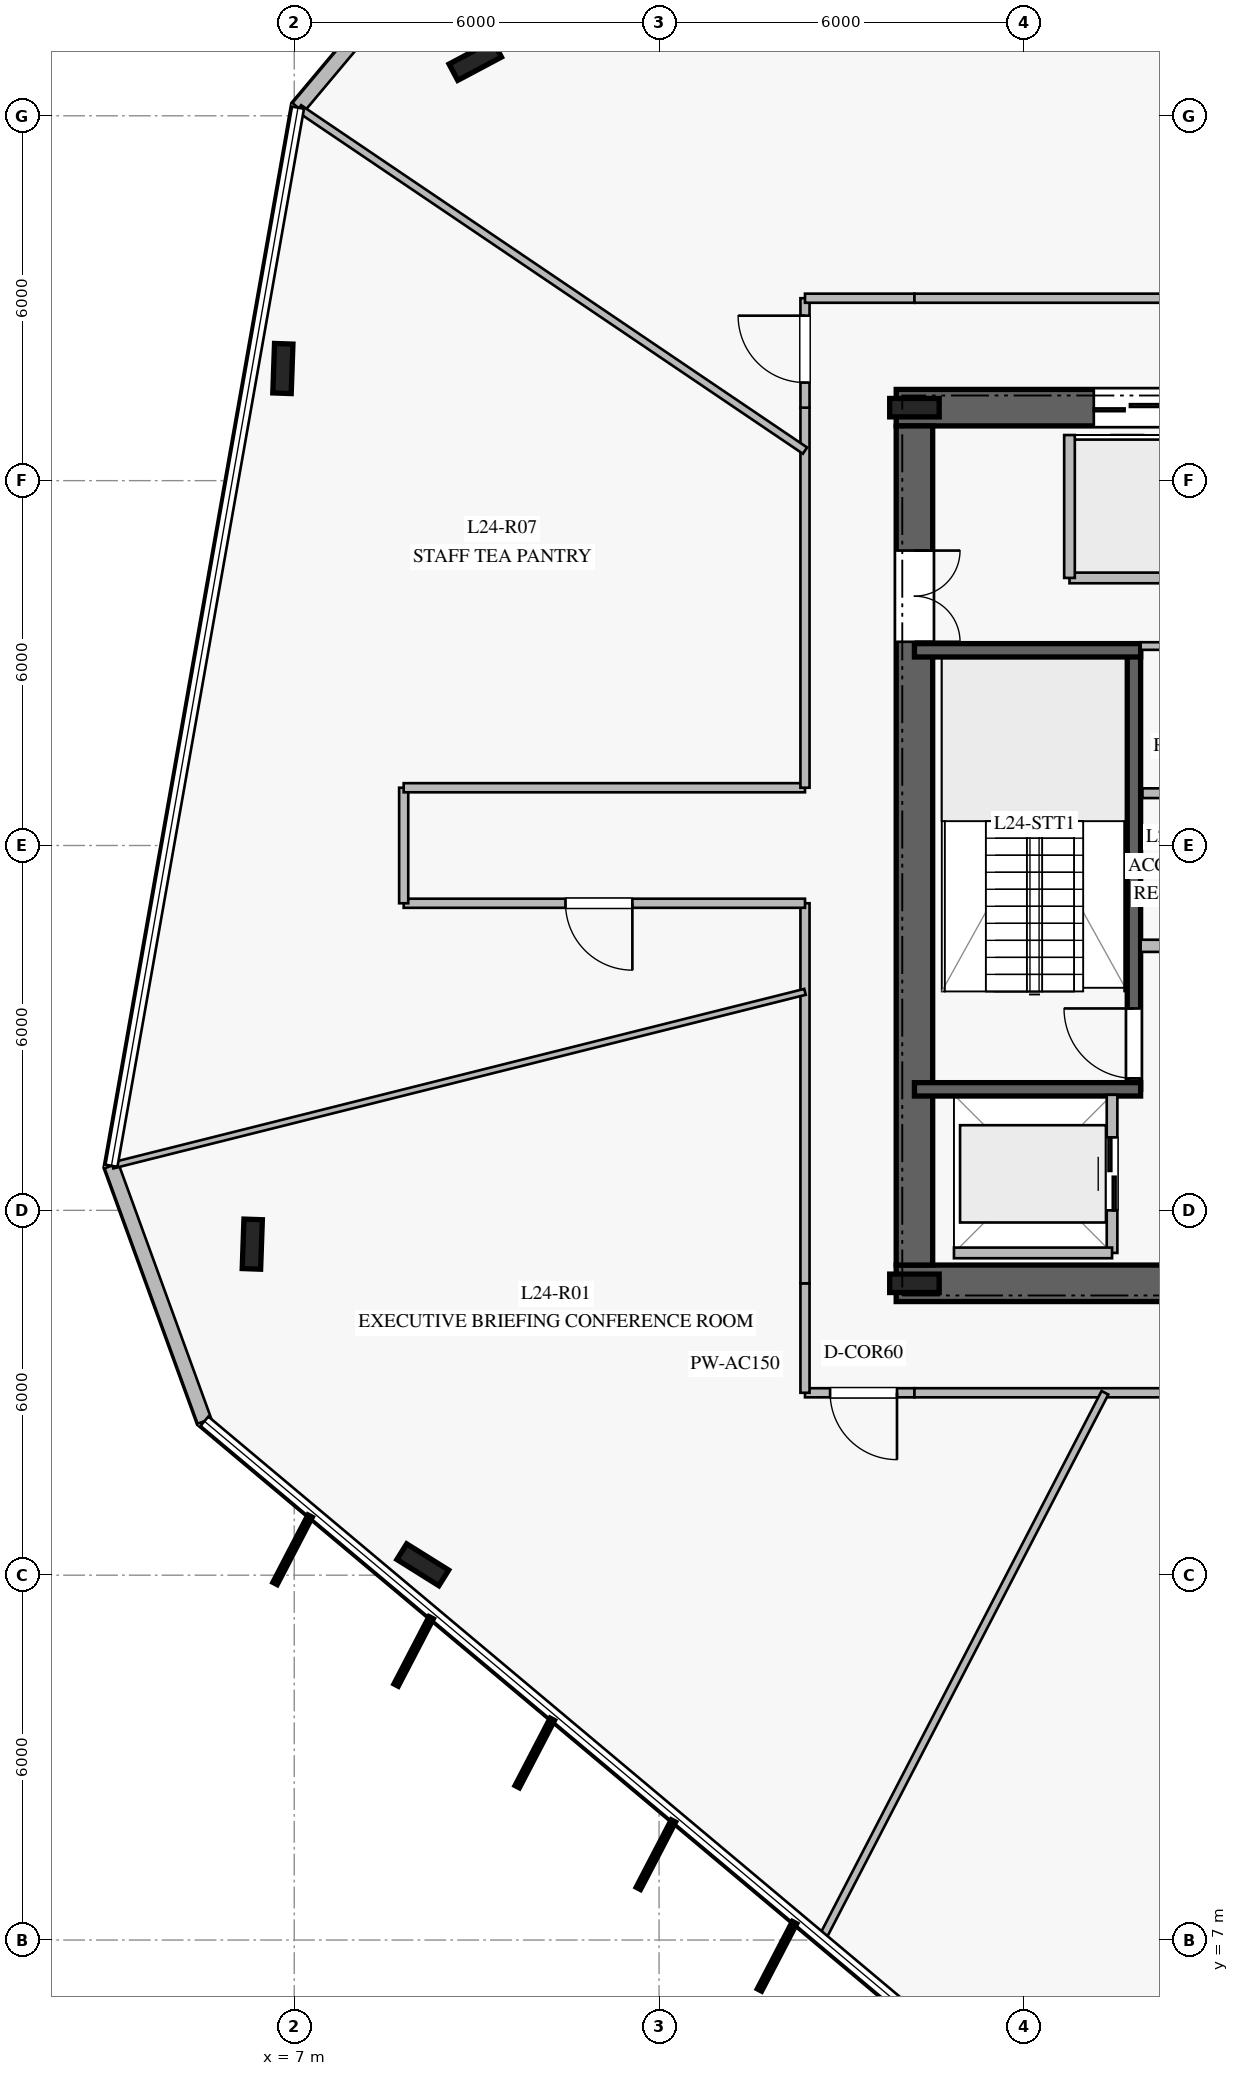
"""IFC4 building model, lengths in metres.
Left out: names, types, materials, properties, quantities, classifications, styles, units other than length and angle.
Written with IfcOpenShell. Run it as: python <this file> out.ifc"""

import sys

from ifc_helpers import new_model, si_unit, direction, frame, frame_2d, origin, origin_2d, place, context, subcontext, project, spatial, rectangle, i_section, extrude, element, fill, save


model = new_model("IFC4")
c1 = context("Model", 3, precision=1e-05, world=origin(), true_north=direction((0.0, 1.0)))
c2 = subcontext(c1, "Body", "Model", "MODEL_VIEW")
j1 = project(units=[si_unit("LENGTHUNIT", "METRE"), si_unit("PLANEANGLEUNIT", "RADIAN")], contexts=[c1])
p1 = place(None, origin())
s1 = spatial("IfcSite", under=j1, at=p1, CompositionType="ELEMENT")
p2 = place(p1, origin())
s2 = spatial("IfcBuilding", under=s1, at=p2, CompositionType="ELEMENT")
p3 = place(p2, frame((0.0, 0.0, 102.4)))
s3 = spatial("IfcBuildingStorey", under=s2, at=p3, CompositionType="ELEMENT", Elevation=102.4)
p4 = place(p3, frame((16.9, 17.8, 0.0), z_axis=(0.0, 0.0, 1.0), x_axis=(1.0, 0.0, 0.0)))
e1 = element("IfcWall", 1, at=p4, inside=s3, PredefinedType="SHEAR", context=c2, shape_type="SweptSolid", body=[
    extrude(rectangle(XDim=16.2, YDim=0.6, at=frame_2d((8.1, 0.0))), origin(), (0.0, 0.0, 1.0), 3.76),
])
p5 = place(p4, frame((5.05, 0.0, 0.0)))
e2 = element("IfcOpeningElement", 2, at=p5, cuts=e1, PredefinedType="OPENING", context=c2, shape_type="SweptSolid", body=[
    extrude(rectangle(XDim=1.2, YDim=2.25, at=frame_2d((0.6, 1.125))), frame((0.0, 0.31, 0.0), z_axis=(0.0, -1.0, 0.0), x_axis=(1.0, 0.0, 0.0)), (0.0, 0.0, 1.0), 0.62),
])
p6 = place(p4, frame((14.0, 0.0, 0.0)))
e3 = element("IfcOpeningElement", 3, at=p6, cuts=e1, PredefinedType="OPENING", context=c2, shape_type="SweptSolid", body=[
    extrude(rectangle(XDim=0.9, YDim=2.1, at=frame_2d((0.45, 1.05))), frame((0.0, 0.31, 0.0), z_axis=(0.0, -1.0, 0.0), x_axis=(1.0, 0.0, 0.0)), (0.0, 0.0, 1.0), 0.62),
])
p7 = place(p3, frame((33.1, 32.2, 0.0), z_axis=(0.0, 0.0, 1.0), x_axis=(-1.0, 0.0, 0.0)))
e4 = element("IfcWall", 4, at=p7, inside=s3, PredefinedType="SHEAR", context=c2, shape_type="SweptSolid", body=[
    extrude(rectangle(XDim=16.2, YDim=0.6, at=frame_2d((8.1, 0.0))), origin(), (0.0, 0.0, 1.0), 3.76),
])
p8 = place(p7, frame((5.05, 0.0, 0.0)))
e5 = element("IfcOpeningElement", 5, at=p8, cuts=e4, PredefinedType="OPENING", context=c2, shape_type="SweptSolid", body=[
    extrude(rectangle(XDim=1.2, YDim=2.25, at=frame_2d((0.6, 1.125))), frame((0.0, 0.31, 0.0), z_axis=(0.0, -1.0, 0.0), x_axis=(1.0, 0.0, 0.0)), (0.0, 0.0, 1.0), 0.62),
])
p9 = place(p7, frame((11.85, 0.0, 0.0)))
e6 = element("IfcOpeningElement", 6, at=p9, cuts=e4, PredefinedType="OPENING", context=c2, shape_type="SweptSolid", body=[
    extrude(rectangle(XDim=1.1, YDim=2.2, at=frame_2d((0.55, 1.1))), frame((0.0, 0.31, 0.0), z_axis=(0.0, -1.0, 0.0), x_axis=(1.0, 0.0, 0.0)), (0.0, 0.0, 1.0), 0.62),
])
p10 = place(p7, frame((9.875, 0.0, 0.0)))
e7 = element("IfcOpeningElement", 7, at=p10, cuts=e4, PredefinedType="OPENING", context=c2, shape_type="SweptSolid", body=[
    extrude(rectangle(XDim=1.1, YDim=2.2, at=frame_2d((0.55, 1.1))), frame((0.0, 0.31, 0.0), z_axis=(0.0, -1.0, 0.0), x_axis=(1.0, 0.0, 0.0)), (0.0, 0.0, 1.0), 0.62),
])
p11 = place(p7, frame((7.9, 0.0, 0.0)))
e8 = element("IfcOpeningElement", 8, at=p11, cuts=e4, PredefinedType="OPENING", context=c2, shape_type="SweptSolid", body=[
    extrude(rectangle(XDim=1.1, YDim=2.2, at=frame_2d((0.55, 1.1))), frame((0.0, 0.31, 0.0), z_axis=(0.0, -1.0, 0.0), x_axis=(1.0, 0.0, 0.0)), (0.0, 0.0, 1.0), 0.62),
])
p12 = place(p3, frame((17.2, 31.9, 0.0), z_axis=(0.0, 0.0, 1.0), x_axis=(0.0, -1.0, 0.0)))
e9 = element("IfcWall", 9, at=p12, inside=s3, PredefinedType="SHEAR", context=c2, shape_type="SweptSolid", body=[
    extrude(rectangle(XDim=13.8, YDim=0.6, at=frame_2d((6.9, 0.0))), origin(), (0.0, 0.0, 1.0), 3.76),
])
p13 = place(p12, frame((2.05, 0.0, 0.0)))
e10 = element("IfcOpeningElement", 10, at=p13, cuts=e9, PredefinedType="OPENING", context=c2, shape_type="SweptSolid", body=[
    extrude(rectangle(XDim=1.5, YDim=2.2, at=frame_2d((0.75, 1.1))), frame((0.0, 0.31, 0.0), z_axis=(0.0, -1.0, 0.0), x_axis=(1.0, 0.0, 0.0)), (0.0, 0.0, 1.0), 0.62),
])
for number, where, z_axis, x_axis in (
    (11, (17.2, 17.8, 0.0), (0.0, 0.0, 1.0), (1.0, 0.0, 0.0)),
    (12, (17.2, 32.2, 0.0), (0.0, 0.0, 1.0), (1.0, 0.0, 0.0)),
):
    element("IfcColumn", number, at=place(p3, frame(where, z_axis=z_axis, x_axis=x_axis)), inside=s3, PredefinedType="COLUMN", context=c2, shape_type="SweptSolid", body=[
        extrude(i_section(OverallWidth=0.303, OverallDepth=0.814, WebThickness=0.021, FlangeThickness=0.04, at=origin_2d()), origin(), (0.0, 0.0, 1.0), 4.0),
    ])
p14 = place(p3, frame((20.81, 20.99, 0.0), z_axis=(0.0, 0.0, 1.0), x_axis=(0.0, 1.0, 0.0)))
e13 = element("IfcWall", 13, at=p14, inside=s3, PredefinedType="SOLIDWALL", context=c2, shape_type="SweptSolid", body=[
    extrude(rectangle(XDim=7.22, YDim=0.22, at=frame_2d((3.61, 0.0))), origin(), (0.0, 0.0, 1.0), 3.76),
])
p15 = place(p14, frame((0.18, 0.0, 0.0)))
e14 = element("IfcOpeningElement", 14, at=p15, cuts=e13, PredefinedType="OPENING", context=c2, shape_type="SweptSolid", body=[
    extrude(rectangle(XDim=1.15, YDim=2.2, at=frame_2d((0.575, 1.1))), frame((0.0, 0.12, 0.0), z_axis=(0.0, -1.0, 0.0), x_axis=(1.0, 0.0, 0.0)), (0.0, 0.0, 1.0), 0.24),
])
for number, where, z_axis, x_axis in (
    (15, (17.2, 20.99, 0.0), (0.0, 0.0, 1.0), (1.0, 0.0, 0.0)),
    (16, (17.2, 28.21, 0.0), (0.0, 0.0, 1.0), (1.0, 0.0, 0.0)),
):
    element("IfcWall", number, at=place(p3, frame(where, z_axis=z_axis, x_axis=x_axis)), inside=s3, PredefinedType="SOLIDWALL", context=c2, shape_type="SweptSolid", body=[
        extrude(rectangle(XDim=3.72, YDim=0.22, at=frame_2d((1.86, 0.0))), origin(), (0.0, 0.0, 1.0), 3.76),
    ])
for number, where, z_axis, x_axis in (
    (17, (9.977, 37.908, 0.0), (0.0, 0.0, 1.0), (0.883, 0.469, 0.0)),
    (18, (6.813, 32.844, 0.0), (0.0, 0.0, 1.0), (0.035, 0.999, 0.0)),
    (19, (6.31, 18.444, 0.0), (0.0, 0.0, 1.0), (0.035, 0.999, 0.0)),
    (20, (9.114, 13.171, 0.0), (0.0, 0.0, 1.0), (-0.848, 0.53, 0.0)),
):
    element("IfcColumn", number, at=place(p3, frame(where, z_axis=z_axis, x_axis=x_axis)), inside=s3, PredefinedType="COLUMN", context=c2, shape_type="SweptSolid", body=[
        extrude(i_section(OverallWidth=0.303, OverallDepth=0.814, WebThickness=0.021, FlangeThickness=0.04, at=origin_2d()), origin(), (0.0, 0.0, 1.0), 4.0),
    ])
for number, where, z_axis, x_axis in (
    (21, (9.936, 40.558, 0.0), (0.0, 0.0, 1.0), (-0.643, -0.766, 0.0)),
    (22, (3.994, 19.733, 0.0), (0.0, 0.0, 1.0), (0.342, -0.94, 0.0)),
):
    element("IfcWall", number, at=place(p3, frame(where, z_axis=z_axis, x_axis=x_axis)), inside=s3, PredefinedType="STANDARD", context=c2, shape_type="SweptSolid", body=[
        extrude(rectangle(XDim=4.47, YDim=0.24, at=frame_2d((2.235, 0.0))), origin(), (0.0, 0.0, 1.0), 3.76),
    ])
p16 = place(p3, frame((20.92, 23.35, 0.0), z_axis=(0.0, 0.0, 1.0), x_axis=(1.0, 0.0, 0.0)))
e23 = element("IfcWall", 23, at=p16, inside=s3, PredefinedType="PARTITIONING", context=c2, shape_type="SweptSolid", body=[
    extrude(rectangle(XDim=3.38, YDim=0.2, at=frame_2d((1.69, 0.0))), origin(), (0.0, 0.0, 1.0), 3.76),
])
p17 = place(p3, frame((20.92, 28.28, 0.0), z_axis=(0.0, 0.0, 1.0), x_axis=(1.0, 0.0, 0.0)))
e24 = element("IfcWall", 24, at=p17, inside=s3, PredefinedType="PARTITIONING", context=c2, shape_type="SweptSolid", body=[
    extrude(rectangle(XDim=3.405, YDim=0.125, at=frame_2d((1.703, 0.0))), origin(), (0.0, 0.0, 1.0), 3.76),
])
p18 = place(p3, frame((20.95, 25.86, 0.0), z_axis=(0.0, 0.0, 1.0), x_axis=(1.0, 0.0, 0.0)))
e25 = element("IfcWall", 25, at=p18, inside=s3, PredefinedType="PLUMBINGWALL", context=c2, shape_type="SweptSolid", body=[
    extrude(rectangle(XDim=3.3, YDim=0.16, at=frame_2d((1.65, 0.0))), origin(), (0.0, 0.0, 1.0), 3.76),
])
p19 = place(p3, frame((19.75, 29.4, 0.0), z_axis=(0.0, 0.0, 1.0), x_axis=(1.0, 0.0, 0.0)))
e26 = element("IfcWall", 26, at=p19, inside=s3, PredefinedType="PARTITIONING", context=c2, shape_type="SweptSolid", body=[
    extrude(rectangle(XDim=1.9, YDim=0.175, at=frame_2d((0.95, 0.0))), origin(), (0.0, 0.0, 1.0), 3.76),
])
p20 = place(p3, frame((19.75, 29.4, 0.0), z_axis=(0.0, 0.0, 1.0), x_axis=(0.0, 1.0, 0.0)))
e27 = element("IfcWall", 27, at=p20, inside=s3, PredefinedType="PARTITIONING", context=c2, shape_type="SweptSolid", body=[
    extrude(rectangle(XDim=2.35, YDim=0.175, at=frame_2d((1.175, 0.0))), origin(), (0.0, 0.0, 1.0), 3.76),
])
p21 = place(p3, frame((20.45, 18.3, 0.0), z_axis=(0.0, 0.0, 1.0), x_axis=(0.0, 1.0, 0.0)))
e28 = element("IfcWall", 28, at=p21, inside=s3, PredefinedType="PARTITIONING", context=c2, shape_type="SweptSolid", body=[
    extrude(rectangle(XDim=2.6, YDim=0.175, at=frame_2d((1.3, 0.0))), origin(), (0.0, 0.0, 1.0), 3.76),
])
p22 = place(p21, frame((0.7, 0.0, 0.0)))
e29 = element("IfcOpeningElement", 29, at=p22, cuts=e28, PredefinedType="OPENING", context=c2, shape_type="SweptSolid", body=[
    extrude(rectangle(XDim=1.2, YDim=2.2, at=frame_2d((0.6, 1.1))), frame((0.0, 0.098, 0.0), z_axis=(0.0, -1.0, 0.0), x_axis=(1.0, 0.0, 0.0)), (0.0, 0.0, 1.0), 0.195),
])
p23 = place(p3, frame((17.85, 18.3, 0.0), z_axis=(0.0, 0.0, 1.0), x_axis=(1.0, 0.0, 0.0)))
e30 = element("IfcWall", 30, at=p23, inside=s3, PredefinedType="PARTITIONING", context=c2, shape_type="SweptSolid", body=[
    extrude(rectangle(XDim=2.6, YDim=0.175, at=frame_2d((1.3, 0.0))), origin(), (0.0, 0.0, 1.0), 3.76),
])
p24 = place(p3, frame((17.2, 16.0, 0.0), z_axis=(0.0, 0.0, 1.0), x_axis=(-1.0, 0.0, 0.0)))
e31 = element("IfcWall", 31, at=p24, inside=s3, PredefinedType="PARTITIONING", context=c2, shape_type="SweptSolid", body=[
    extrude(rectangle(XDim=1.8, YDim=0.15, at=frame_2d((0.9, 0.0))), origin(), (0.0, 0.0, 1.0), 3.36),
])
p25 = place(p24, frame((0.287, 0.0, 0.0)))
e32 = element("IfcOpeningElement", 32, at=p25, cuts=e31, PredefinedType="OPENING", context=c2, shape_type="SweptSolid", body=[
    extrude(rectangle(XDim=1.1, YDim=2.2, at=frame_2d((0.55, 1.1))), frame((0.0, 0.085, 0.0), z_axis=(0.0, -1.0, 0.0), x_axis=(1.0, 0.0, 0.0)), (0.0, 0.0, 1.0), 0.17),
])
p26 = place(p3, frame((15.4, 16.0, 0.0), z_axis=(0.0, 0.0, 1.0), x_axis=(0.0, 1.0, 0.0)))
e33 = element("IfcWall", 33, at=p26, inside=s3, PredefinedType="PARTITIONING", context=c2, shape_type="SweptSolid", body=[
    extrude(rectangle(XDim=1.8, YDim=0.15, at=frame_2d((0.9, 0.0))), origin(), (0.0, 0.0, 1.0), 3.21),
])
p27 = place(p3, frame((15.4, 17.8, 0.0), z_axis=(0.0, 0.0, 1.0), x_axis=(0.0, 1.0, 0.0)))
e34 = element("IfcWall", 34, at=p27, inside=s3, PredefinedType="PARTITIONING", context=c2, shape_type="SweptSolid", body=[
    extrude(rectangle(XDim=6.25, YDim=0.15, at=frame_2d((3.125, 0.0))), origin(), (0.0, 0.0, 1.0), 3.21),
])
p28 = place(p3, frame((15.4, 24.05, 0.0), z_axis=(0.0, 0.0, 1.0), x_axis=(-1.0, 0.0, 0.0)))
e35 = element("IfcWall", 35, at=p28, inside=s3, PredefinedType="PARTITIONING", context=c2, shape_type="SweptSolid", body=[
    extrude(rectangle(XDim=6.6, YDim=0.15, at=frame_2d((3.3, 0.0))), origin(), (0.0, 0.0, 1.0), 3.05),
])
p29 = place(p28, frame((2.839, 0.0, 0.0)))
e36 = element("IfcOpeningElement", 36, at=p29, cuts=e35, PredefinedType="OPENING", context=c2, shape_type="SweptSolid", body=[
    extrude(rectangle(XDim=1.1, YDim=2.2, at=frame_2d((0.55, 1.1))), frame((0.0, 0.085, 0.0), z_axis=(0.0, -1.0, 0.0), x_axis=(1.0, 0.0, 0.0)), (0.0, 0.0, 1.0), 0.17),
])
p30 = place(p3, frame((8.8, 24.05, 0.0), z_axis=(0.0, 0.0, 1.0), x_axis=(0.0, 1.0, 0.0)))
e37 = element("IfcWall", 37, at=p30, inside=s3, PredefinedType="PARTITIONING", context=c2, shape_type="SweptSolid", body=[
    extrude(rectangle(XDim=1.9, YDim=0.15, at=frame_2d((0.95, 0.0))), origin(), (0.0, 0.0, 1.0), 3.3),
])
p31 = place(p3, frame((8.8, 25.95, 0.0), z_axis=(0.0, 0.0, 1.0), x_axis=(1.0, 0.0, 0.0)))
e38 = element("IfcWall", 38, at=p31, inside=s3, PredefinedType="PARTITIONING", context=c2, shape_type="SweptSolid", body=[
    extrude(rectangle(XDim=6.6, YDim=0.15, at=frame_2d((3.3, 0.0))), origin(), (0.0, 0.0, 1.0), 3.05),
])
p32 = place(p3, frame((15.4, 25.95, 0.0), z_axis=(0.0, 0.0, 1.0), x_axis=(0.0, 1.0, 0.0)))
e39 = element("IfcWall", 39, at=p32, inside=s3, PredefinedType="PARTITIONING", context=c2, shape_type="SweptSolid", body=[
    extrude(rectangle(XDim=6.25, YDim=0.15, at=frame_2d((3.125, 0.0))), origin(), (0.0, 0.0, 1.0), 3.21),
])
p33 = place(p3, frame((15.4, 32.2, 0.0), z_axis=(0.0, 0.0, 1.0), x_axis=(0.0, 1.0, 0.0)))
e40 = element("IfcWall", 40, at=p33, inside=s3, PredefinedType="PARTITIONING", context=c2, shape_type="SweptSolid", body=[
    extrude(rectangle(XDim=1.8, YDim=0.15, at=frame_2d((0.9, 0.0))), origin(), (0.0, 0.0, 1.0), 3.21),
])
p34 = place(p33, frame((0.413, 0.0, 0.0)))
e41 = element("IfcOpeningElement", 41, at=p34, cuts=e40, PredefinedType="OPENING", context=c2, shape_type="SweptSolid", body=[
    extrude(rectangle(XDim=1.1, YDim=2.2, at=frame_2d((0.55, 1.1))), frame((0.0, 0.085, 0.0), z_axis=(0.0, -1.0, 0.0), x_axis=(1.0, 0.0, 0.0)), (0.0, 0.0, 1.0), 0.17),
])
p35 = place(p3, frame((15.4, 34.0, 0.0), z_axis=(0.0, 0.0, 1.0), x_axis=(1.0, 0.0, 0.0)))
e42 = element("IfcWall", 42, at=p35, inside=s3, PredefinedType="PARTITIONING", context=c2, shape_type="SweptSolid", body=[
    extrude(rectangle(XDim=1.8, YDim=0.15, at=frame_2d((0.9, 0.0))), origin(), (0.0, 0.0, 1.0), 3.76),
])
for number, where, z_axis, x_axis in (
    (43, (17.2, 34.0, 0.0), (0.0, 0.0, 1.0), (1.0, 0.0, 0.0)),
    (44, (24.05, 16.0, 0.0), (0.0, 0.0, 1.0), (-1.0, 0.0, 0.0)),
):
    element("IfcWall", number, at=place(p3, frame(where, z_axis=z_axis, x_axis=x_axis)), inside=s3, PredefinedType="PARTITIONING", context=c2, shape_type="SweptSolid", body=[
        extrude(rectangle(XDim=6.85, YDim=0.15, at=frame_2d((3.425, 0.0))), origin(), (0.0, 0.0, 1.0), 3.21),
    ])
p36 = place(p3, frame((23.167, 34.0, 0.0), z_axis=(0.0, 0.0, 1.0), x_axis=(-0.199561430281, 0.979885317547, 0.0)))
e45 = element("IfcWall", 45, at=p36, inside=s3, PredefinedType="MOVABLE", context=c2, shape_type="SweptSolid", body=[
    extrude(rectangle(XDim=10.789, YDim=0.1, at=frame_2d((5.395, 0.0))), origin(), (0.0, 0.0, 1.0), 3.16),
])
p37 = place(p3, frame((15.4, 31.494, 0.0), z_axis=(0.0, 0.0, 1.0), x_axis=(-0.828304308863, 0.560278477116, 0.0)))
e46 = element("IfcWall", 46, at=p37, inside=s3, PredefinedType="PARTITIONING", context=c2, shape_type="SweptSolid", body=[
    extrude(rectangle(XDim=10.047, YDim=0.125, at=frame_2d((5.023, 0.0))), origin(), (0.0, 0.0, 1.0), 3.16),
])
p38 = place(p3, frame((15.4, 22.593, 0.0), z_axis=(0.0, 0.0, 1.0), x_axis=(-0.969982044696, -0.243176546911, 0.0)))
e47 = element("IfcWall", 47, at=p38, inside=s3, PredefinedType="MOVABLE", context=c2, shape_type="SweptSolid", body=[
    extrude(rectangle(XDim=11.74, YDim=0.1, at=frame_2d((5.87, 0.0))), origin(), (0.0, 0.0, 1.0), 3.05),
])
p39 = place(p3, frame((20.333, 16.0, 0.0), z_axis=(0.0, 0.0, 1.0), x_axis=(-0.46022405939, -0.887802801955, 0.0)))
e48 = element("IfcWall", 48, at=p39, inside=s3, PredefinedType="PARTITIONING", context=c2, shape_type="SweptSolid", body=[
    extrude(rectangle(XDim=10.104, YDim=0.125, at=frame_2d((5.052, 0.0))), origin(), (0.0, 0.0, 1.0), 3.16),
])
p40 = place(p15, origin())
e49 = element("IfcDoor", 49, at=p40, inside=s3, OperationType="SINGLE_SWING_RIGHT", PredefinedType="DOOR", context=c2, shape_type="SweptSolid", body=[
    extrude(rectangle(XDim=1.15, YDim=2.2, at=frame_2d((0.575, 1.1))), frame((0.0, 0.025, 0.0), z_axis=(0.0, -1.0, 0.0), x_axis=(1.0, 0.0, 0.0)), (0.0, 0.0, 1.0), 0.05),
])
fill(e14, e49)
p41 = place(p13, origin())
e50 = element("IfcDoor", 50, at=p41, inside=s3, OperationType="DOUBLE_DOOR_SINGLE_SWING", PredefinedType="DOOR", context=c2, shape_type="SweptSolid", body=[
    extrude(rectangle(XDim=1.5, YDim=2.2, at=frame_2d((0.75, 1.1))), frame((0.0, 0.025, 0.0), z_axis=(0.0, -1.0, 0.0), x_axis=(1.0, 0.0, 0.0)), (0.0, 0.0, 1.0), 0.05),
])
fill(e10, e50)
p42 = place(p9, origin())
e51 = element("IfcDoor", 51, at=p42, inside=s3, OperationType="DOUBLE_DOOR_SLIDING", PredefinedType="DOOR", context=c2, shape_type="SweptSolid", body=[
    extrude(rectangle(XDim=1.1, YDim=2.2, at=frame_2d((0.55, 1.1))), frame((0.0, 0.025, 0.0), z_axis=(0.0, -1.0, 0.0), x_axis=(1.0, 0.0, 0.0)), (0.0, 0.0, 1.0), 0.05),
])
fill(e6, e51)
p43 = place(p22, origin())
e52 = element("IfcDoor", 52, at=p43, inside=s3, OperationType="DOUBLE_DOOR_SLIDING", PredefinedType="DOOR", context=c2, shape_type="SweptSolid", body=[
    extrude(rectangle(XDim=1.2, YDim=2.2, at=frame_2d((0.6, 1.1))), frame((0.0, 0.025, 0.0), z_axis=(0.0, -1.0, 0.0), x_axis=(1.0, 0.0, 0.0)), (0.0, 0.0, 1.0), 0.05),
])
fill(e29, e52)
p44 = place(p25, origin())
e53 = element("IfcDoor", 53, at=p44, inside=s3, OperationType="SINGLE_SWING_LEFT", PredefinedType="DOOR", context=c2, shape_type="SweptSolid", body=[
    extrude(rectangle(XDim=1.1, YDim=2.2, at=frame_2d((0.55, 1.1))), frame((0.0, 0.025, 0.0), z_axis=(0.0, -1.0, 0.0), x_axis=(1.0, 0.0, 0.0)), (0.0, 0.0, 1.0), 0.05),
])
fill(e32, e53)
p45 = place(p34, origin())
e54 = element("IfcDoor", 54, at=p45, inside=s3, OperationType="SINGLE_SWING_RIGHT", PredefinedType="DOOR", context=c2, shape_type="SweptSolid", body=[
    extrude(rectangle(XDim=1.1, YDim=2.2, at=frame_2d((0.55, 1.1))), frame((0.0, 0.025, 0.0), z_axis=(0.0, -1.0, 0.0), x_axis=(1.0, 0.0, 0.0)), (0.0, 0.0, 1.0), 0.05),
])
fill(e41, e54)
p46 = place(p29, origin())
e55 = element("IfcDoor", 55, at=p46, inside=s3, OperationType="SINGLE_SWING_LEFT", PredefinedType="DOOR", context=c2, shape_type="SweptSolid", body=[
    extrude(rectangle(XDim=1.1, YDim=2.2, at=frame_2d((0.55, 1.1))), frame((0.0, 0.025, 0.0), z_axis=(0.0, -1.0, 0.0), x_axis=(1.0, 0.0, 0.0)), (0.0, 0.0, 1.0), 0.05),
])
fill(e36, e55)
save(model, sys.argv[1])
